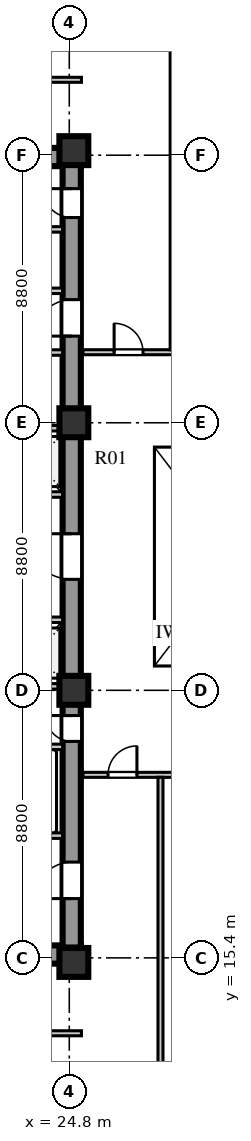
"""IFC4 building model, lengths in metres.
Left out: names, types, materials, properties, quantities, classifications, styles, units other than length and angle.
Written with IfcOpenShell. Run it as: python <this file> out.ifc"""

import sys

from ifc_helpers import new_model, si_unit, direction, frame, frame_2d, origin, origin_2d, place, context, subcontext, project, spatial, rectangle, extrude, element, fill, save


model = new_model("IFC4")
c1 = context("Model", 3, precision=1e-05, world=origin(), true_north=direction((0.0, 1.0)))
c2 = subcontext(c1, "Body", "Model", "MODEL_VIEW")
j1 = project(units=[si_unit("LENGTHUNIT", "METRE"), si_unit("PLANEANGLEUNIT", "RADIAN")], contexts=[c1])
p1 = place(None, origin())
s1 = spatial("IfcSite", under=j1, at=p1, CompositionType="ELEMENT")
p2 = place(p1, origin())
s2 = spatial("IfcBuilding", under=s1, at=p2, CompositionType="ELEMENT")
p3 = place(p2, frame((0.0, 0.0, 66.0)))
s3 = spatial("IfcBuildingStorey", under=s2, at=p3, CompositionType="ELEMENT", Elevation=66.0)
for number, where, z_axis, x_axis in (
    (1, (15.3, 15.51, 0.0), (0.0, 0.0, 1.0), (1.0, 0.0, 0.0)),
    (2, (15.3, 41.74, 0.0), (0.0, 0.0, 1.0), (1.0, 0.0, 0.0)),
):
    element("IfcWall", number, at=place(p3, frame(where, z_axis=z_axis, x_axis=x_axis)), inside=s3, PredefinedType="SHEAR", context=c2, shape_type="SweptSolid", body=[
        extrude(rectangle(XDim=9.88, YDim=0.6, at=frame_2d((4.94, 0.0))), origin(), (0.0, 0.0, 1.0), 3.72),
    ])
p4 = place(p3, frame((24.88, 15.74, 0.0), z_axis=(0.0, 0.0, 1.0), x_axis=(0.0, 1.0, 0.0)))
e3 = element("IfcWall", 3, at=p4, inside=s3, PredefinedType="SHEAR", context=c2, shape_type="SweptSolid", body=[
    extrude(rectangle(XDim=25.76, YDim=0.6, at=frame_2d((12.88, 0.0))), origin(), (0.0, 0.0, 1.0), 3.72),
])
p5 = place(p4, frame((1.61, 0.0, 0.0)))
e4 = element("IfcOpeningElement", 4, at=p5, cuts=e3, PredefinedType="OPENING", context=c2, shape_type="SweptSolid", body=[
    extrude(rectangle(XDim=1.2, YDim=2.1, at=frame_2d((0.6, 1.05))), frame((0.0, 0.31, 0.0), z_axis=(0.0, -1.0, 0.0), x_axis=(1.0, 0.0, 0.0)), (0.0, 0.0, 1.0), 0.62),
])
p6 = place(p4, frame((6.78, 0.0, 0.0)))
e5 = element("IfcOpeningElement", 5, at=p6, cuts=e3, PredefinedType="OPENING", context=c2, shape_type="SweptSolid", body=[
    extrude(rectangle(XDim=0.85, YDim=2.06, at=frame_2d((0.425, 1.03))), frame((0.0, 0.31, 0.0), z_axis=(0.0, -1.0, 0.0), x_axis=(1.0, 0.0, 0.0)), (0.0, 0.0, 1.0), 0.62),
])
p7 = place(p4, frame((12.11, 0.0, 0.0)))
e6 = element("IfcOpeningElement", 6, at=p7, cuts=e3, PredefinedType="OPENING", context=c2, shape_type="SweptSolid", body=[
    extrude(rectangle(XDim=1.5, YDim=2.12, at=frame_2d((0.75, 1.06))), frame((0.0, 0.31, 0.0), z_axis=(0.0, -1.0, 0.0), x_axis=(1.0, 0.0, 0.0)), (0.0, 0.0, 1.0), 0.62),
])
p8 = place(p4, frame((20.11, 0.0, 0.0)))
e7 = element("IfcOpeningElement", 7, at=p8, cuts=e3, PredefinedType="OPENING", context=c2, shape_type="SweptSolid", body=[
    extrude(rectangle(XDim=1.2, YDim=2.12, at=frame_2d((0.6, 1.06))), frame((0.0, 0.31, 0.0), z_axis=(0.0, -1.0, 0.0), x_axis=(1.0, 0.0, 0.0)), (0.0, 0.0, 1.0), 0.62),
])
p9 = place(p4, frame((24.01, 0.0, 0.0)))
e8 = element("IfcOpeningElement", 8, at=p9, cuts=e3, PredefinedType="OPENING", context=c2, shape_type="SweptSolid", body=[
    extrude(rectangle(XDim=0.95, YDim=2.1, at=frame_2d((0.475, 1.05))), frame((0.0, 0.31, 0.0), z_axis=(0.0, -1.0, 0.0), x_axis=(1.0, 0.0, 0.0)), (0.0, 0.0, 1.0), 0.62),
])
for number, where, z_axis, x_axis in (
    (9, (24.95, 15.25, 0.0), (0.0, 0.0, 1.0), (1.0, 0.0, 0.0)),
    (10, (24.95, 24.2, 0.0), (0.0, 0.0, 1.0), (1.0, 0.0, 0.0)),
    (11, (24.95, 33.0, 0.0), (0.0, 0.0, 1.0), (1.0, 0.0, 0.0)),
    (12, (24.95, 41.95, 0.0), (0.0, 0.0, 1.0), (1.0, 0.0, 0.0)),
):
    element("IfcColumn", number, at=place(p3, frame(where, z_axis=z_axis, x_axis=x_axis)), inside=s3, PredefinedType="COLUMN", context=c2, shape_type="SweptSolid", body=[
        extrude(rectangle(XDim=0.95, YDim=0.95, at=origin_2d()), origin(), (0.0, 0.0, 1.0), 3.72),
    ])
p10 = place(p3, frame((19.64, 19.42, 0.0), z_axis=(0.0, 0.0, 1.0), x_axis=(1.0, 0.0, 0.0)))
e13 = element("IfcWall", 13, at=p10, inside=s3, PredefinedType="SOLIDWALL", context=c2, shape_type="SweptSolid", body=[
    extrude(rectangle(XDim=4.94, YDim=0.18, at=frame_2d((2.47, 0.0))), origin(), (0.0, 0.0, 1.0), 3.72),
])
p11 = place(p10, frame((0.72, 0.0, 0.0)))
e14 = element("IfcOpeningElement", 14, at=p11, cuts=e13, PredefinedType="OPENING", context=c2, shape_type="SweptSolid", body=[
    extrude(rectangle(XDim=1.1, YDim=2.1, at=frame_2d((0.55, 1.05))), frame((0.0, 0.1, 0.0), z_axis=(0.0, -1.0, 0.0), x_axis=(1.0, 0.0, 0.0)), (0.0, 0.0, 1.0), 0.2),
])
p12 = place(p10, frame((3.02, 0.0, 0.0)))
e15 = element("IfcOpeningElement", 15, at=p12, cuts=e13, PredefinedType="OPENING", context=c2, shape_type="SweptSolid", body=[
    extrude(rectangle(XDim=1.1, YDim=2.1, at=frame_2d((0.55, 1.05))), frame((0.0, 0.1, 0.0), z_axis=(0.0, -1.0, 0.0), x_axis=(1.0, 0.0, 0.0)), (0.0, 0.0, 1.0), 0.2),
])
p13 = place(p3, frame((19.64, 22.34, 0.0), z_axis=(0.0, 0.0, 1.0), x_axis=(1.0, 0.0, 0.0)))
e16 = element("IfcWall", 16, at=p13, inside=s3, PredefinedType="SOLIDWALL", context=c2, shape_type="SweptSolid", body=[
    extrude(rectangle(XDim=4.94, YDim=0.18, at=frame_2d((2.47, 0.0))), origin(), (0.0, 0.0, 1.0), 3.72),
])
p14 = place(p3, frame((15.9, 26.52, 0.0), z_axis=(0.0, 0.0, 1.0), x_axis=(1.0, 0.0, 0.0)))
e17 = element("IfcWall", 17, at=p14, inside=s3, PredefinedType="SOLIDWALL", context=c2, shape_type="SweptSolid", body=[
    extrude(rectangle(XDim=8.68, YDim=0.18, at=frame_2d((4.34, 0.0))), origin(), (0.0, 0.0, 1.0), 3.72),
])
p15 = place(p14, frame((1.76, 0.0, 0.0)))
e18 = element("IfcOpeningElement", 18, at=p15, cuts=e17, PredefinedType="OPENING", context=c2, shape_type="SweptSolid", body=[
    extrude(rectangle(XDim=1.0, YDim=2.1, at=frame_2d((0.5, 1.05))), frame((0.0, 0.1, 0.0), z_axis=(0.0, -1.0, 0.0), x_axis=(1.0, 0.0, 0.0)), (0.0, 0.0, 1.0), 0.2),
])
p16 = place(p14, frame((3.6, 0.0, 0.0)))
e19 = element("IfcOpeningElement", 19, at=p16, cuts=e17, PredefinedType="OPENING", context=c2, shape_type="SweptSolid", body=[
    extrude(rectangle(XDim=1.0, YDim=2.1, at=frame_2d((0.5, 1.05))), frame((0.0, 0.1, 0.0), z_axis=(0.0, -1.0, 0.0), x_axis=(1.0, 0.0, 0.0)), (0.0, 0.0, 1.0), 0.2),
])
p17 = place(p14, frame((5.44, 0.0, 0.0)))
e20 = element("IfcOpeningElement", 20, at=p17, cuts=e17, PredefinedType="OPENING", context=c2, shape_type="SweptSolid", body=[
    extrude(rectangle(XDim=1.0, YDim=2.1, at=frame_2d((0.5, 1.05))), frame((0.0, 0.1, 0.0), z_axis=(0.0, -1.0, 0.0), x_axis=(1.0, 0.0, 0.0)), (0.0, 0.0, 1.0), 0.2),
])
p18 = place(p14, frame((7.28, 0.0, 0.0)))
e21 = element("IfcOpeningElement", 21, at=p18, cuts=e17, PredefinedType="OPENING", context=c2, shape_type="SweptSolid", body=[
    extrude(rectangle(XDim=1.0, YDim=2.1, at=frame_2d((0.5, 1.05))), frame((0.0, 0.1, 0.0), z_axis=(0.0, -1.0, 0.0), x_axis=(1.0, 0.0, 0.0)), (0.0, 0.0, 1.0), 0.2),
])
p19 = place(p3, frame((15.9, 24.33, 0.0), z_axis=(0.0, 0.0, 1.0), x_axis=(1.0, 0.0, 0.0)))
e22 = element("IfcWall", 22, at=p19, inside=s3, PredefinedType="SOLIDWALL", context=c2, shape_type="SweptSolid", body=[
    extrude(rectangle(XDim=8.68, YDim=0.18, at=frame_2d((4.34, 0.0))), origin(), (0.0, 0.0, 1.0), 3.02),
])
p20 = place(p3, frame((15.9, 30.64, 0.0), z_axis=(0.0, 0.0, 1.0), x_axis=(1.0, 0.0, 0.0)))
e23 = element("IfcWall", 23, at=p20, inside=s3, PredefinedType="SOLIDWALL", context=c2, shape_type="SweptSolid", body=[
    extrude(rectangle(XDim=8.68, YDim=0.18, at=frame_2d((4.34, 0.0))), origin(), (0.0, 0.0, 1.0), 3.72),
])
p21 = place(p20, frame((1.76, 0.0, 0.0)))
e24 = element("IfcOpeningElement", 24, at=p21, cuts=e23, PredefinedType="OPENING", context=c2, shape_type="SweptSolid", body=[
    extrude(rectangle(XDim=1.0, YDim=2.1, at=frame_2d((0.5, 1.05))), frame((0.0, 0.1, 0.0), z_axis=(0.0, -1.0, 0.0), x_axis=(1.0, 0.0, 0.0)), (0.0, 0.0, 1.0), 0.2),
])
p22 = place(p20, frame((3.6, 0.0, 0.0)))
e25 = element("IfcOpeningElement", 25, at=p22, cuts=e23, PredefinedType="OPENING", context=c2, shape_type="SweptSolid", body=[
    extrude(rectangle(XDim=1.0, YDim=2.1, at=frame_2d((0.5, 1.05))), frame((0.0, 0.1, 0.0), z_axis=(0.0, -1.0, 0.0), x_axis=(1.0, 0.0, 0.0)), (0.0, 0.0, 1.0), 0.2),
])
p23 = place(p20, frame((5.44, 0.0, 0.0)))
e26 = element("IfcOpeningElement", 26, at=p23, cuts=e23, PredefinedType="OPENING", context=c2, shape_type="SweptSolid", body=[
    extrude(rectangle(XDim=1.0, YDim=2.1, at=frame_2d((0.5, 1.05))), frame((0.0, 0.1, 0.0), z_axis=(0.0, -1.0, 0.0), x_axis=(1.0, 0.0, 0.0)), (0.0, 0.0, 1.0), 0.2),
])
p24 = place(p20, frame((7.28, 0.0, 0.0)))
e27 = element("IfcOpeningElement", 27, at=p24, cuts=e23, PredefinedType="OPENING", context=c2, shape_type="SweptSolid", body=[
    extrude(rectangle(XDim=1.0, YDim=2.1, at=frame_2d((0.5, 1.05))), frame((0.0, 0.1, 0.0), z_axis=(0.0, -1.0, 0.0), x_axis=(1.0, 0.0, 0.0)), (0.0, 0.0, 1.0), 0.2),
])
p25 = place(p3, frame((15.9, 32.82, 0.0), z_axis=(0.0, 0.0, 1.0), x_axis=(1.0, 0.0, 0.0)))
e28 = element("IfcWall", 28, at=p25, inside=s3, PredefinedType="SOLIDWALL", context=c2, shape_type="SweptSolid", body=[
    extrude(rectangle(XDim=8.68, YDim=0.18, at=frame_2d((4.34, 0.0))), origin(), (0.0, 0.0, 1.0), 3.02),
])
p26 = place(p3, frame((22.02, 35.31, 0.0), z_axis=(0.0, 0.0, 1.0), x_axis=(1.0, 0.0, 0.0)))
e29 = element("IfcWall", 29, at=p26, inside=s3, PredefinedType="SOLIDWALL", context=c2, shape_type="SweptSolid", body=[
    extrude(rectangle(XDim=2.56, YDim=0.18, at=frame_2d((1.28, 0.0))), origin(), (0.0, 0.0, 1.0), 3.72),
])
p27 = place(p26, frame((0.55, 0.0, 0.0)))
e30 = element("IfcOpeningElement", 30, at=p27, cuts=e29, PredefinedType="OPENING", context=c2, shape_type="SweptSolid", body=[
    extrude(rectangle(XDim=1.0, YDim=2.1, at=frame_2d((0.5, 1.05))), frame((0.0, 0.1, 0.0), z_axis=(0.0, -1.0, 0.0), x_axis=(1.0, 0.0, 0.0)), (0.0, 0.0, 1.0), 0.2),
])
p28 = place(p3, frame((19.64, 37.34, 0.0), z_axis=(0.0, 0.0, 1.0), x_axis=(1.0, 0.0, 0.0)))
e31 = element("IfcWall", 31, at=p28, inside=s3, PredefinedType="SOLIDWALL", context=c2, shape_type="SweptSolid", body=[
    extrude(rectangle(XDim=4.94, YDim=0.18, at=frame_2d((2.47, 0.0))), origin(), (0.0, 0.0, 1.0), 3.72),
])
p29 = place(p28, frame((0.45, 0.0, 0.0)))
e32 = element("IfcOpeningElement", 32, at=p29, cuts=e31, PredefinedType="OPENING", context=c2, shape_type="SweptSolid", body=[
    extrude(rectangle(XDim=1.0, YDim=2.1, at=frame_2d((0.5, 1.05))), frame((0.0, 0.1, 0.0), z_axis=(0.0, -1.0, 0.0), x_axis=(1.0, 0.0, 0.0)), (0.0, 0.0, 1.0), 0.2),
])
p30 = place(p28, frame((2.5, 0.0, 0.0)))
e33 = element("IfcOpeningElement", 33, at=p30, cuts=e31, PredefinedType="OPENING", context=c2, shape_type="SweptSolid", body=[
    extrude(rectangle(XDim=1.0, YDim=2.1, at=frame_2d((0.5, 1.05))), frame((0.0, 0.1, 0.0), z_axis=(0.0, -1.0, 0.0), x_axis=(1.0, 0.0, 0.0)), (0.0, 0.0, 1.0), 0.2),
])
p31 = place(p3, frame((19.64, 39.36, 0.0), z_axis=(0.0, 0.0, 1.0), x_axis=(1.0, 0.0, 0.0)))
e34 = element("IfcWall", 34, at=p31, inside=s3, PredefinedType="SOLIDWALL", context=c2, shape_type="SweptSolid", body=[
    extrude(rectangle(XDim=4.94, YDim=0.18, at=frame_2d((2.47, 0.0))), origin(), (0.0, 0.0, 1.0), 3.72),
])
p32 = place(p3, frame((25.25, 21.42, 0.0), z_axis=(0.0, 0.0, 1.0), x_axis=(1.0, 0.0, 0.0)))
e35 = element("IfcWall", 35, at=p32, inside=s3, PredefinedType="PARTITIONING", context=c2, shape_type="SweptSolid", body=[
    extrude(rectangle(XDim=12.87, YDim=0.165, at=frame_2d((6.435, 0.0))), origin(), (0.0, 0.0, 1.0), 3.32),
])
p33 = place(p32, frame((0.825, 0.0, 0.0)))
e36 = element("IfcOpeningElement", 36, at=p33, cuts=e35, PredefinedType="OPENING", context=c2, shape_type="SweptSolid", body=[
    extrude(rectangle(XDim=0.95, YDim=2.08, at=frame_2d((0.475, 1.04))), frame((0.0, 0.093, 0.0), z_axis=(0.0, -1.0, 0.0), x_axis=(1.0, 0.0, 0.0)), (0.0, 0.0, 1.0), 0.185),
])
p34 = place(p32, frame((3.325, 0.0, 0.0)))
e37 = element("IfcOpeningElement", 37, at=p34, cuts=e35, PredefinedType="OPENING", context=c2, shape_type="SweptSolid", body=[
    extrude(rectangle(XDim=0.95, YDim=2.08, at=frame_2d((0.475, 1.04))), frame((0.0, 0.093, 0.0), z_axis=(0.0, -1.0, 0.0), x_axis=(1.0, 0.0, 0.0)), (0.0, 0.0, 1.0), 0.185),
])
p35 = place(p32, frame((5.825, 0.0, 0.0)))
e38 = element("IfcOpeningElement", 38, at=p35, cuts=e35, PredefinedType="OPENING", context=c2, shape_type="SweptSolid", body=[
    extrude(rectangle(XDim=0.95, YDim=2.08, at=frame_2d((0.475, 1.04))), frame((0.0, 0.093, 0.0), z_axis=(0.0, -1.0, 0.0), x_axis=(1.0, 0.0, 0.0)), (0.0, 0.0, 1.0), 0.185),
])
p36 = place(p32, frame((8.375, 0.0, 0.0)))
e39 = element("IfcOpeningElement", 39, at=p36, cuts=e35, PredefinedType="OPENING", context=c2, shape_type="SweptSolid", body=[
    extrude(rectangle(XDim=0.95, YDim=2.08, at=frame_2d((0.475, 1.04))), frame((0.0, 0.093, 0.0), z_axis=(0.0, -1.0, 0.0), x_axis=(1.0, 0.0, 0.0)), (0.0, 0.0, 1.0), 0.185),
])
p37 = place(p32, frame((10.995, 0.0, 0.0)))
e40 = element("IfcOpeningElement", 40, at=p37, cuts=e35, PredefinedType="OPENING", context=c2, shape_type="SweptSolid", body=[
    extrude(rectangle(XDim=0.95, YDim=2.08, at=frame_2d((0.475, 1.04))), frame((0.0, 0.093, 0.0), z_axis=(0.0, -1.0, 0.0), x_axis=(1.0, 0.0, 0.0)), (0.0, 0.0, 1.0), 0.185),
])
p38 = place(p3, frame((25.25, 35.32, 0.0), z_axis=(0.0, 0.0, 1.0), x_axis=(1.0, 0.0, 0.0)))
e41 = element("IfcWall", 41, at=p38, inside=s3, PredefinedType="PARTITIONING", context=c2, shape_type="SweptSolid", body=[
    extrude(rectangle(XDim=9.47, YDim=0.165, at=frame_2d((4.735, 0.0))), origin(), (0.0, 0.0, 1.0), 3.72),
])
p39 = place(p38, frame((1.025, 0.0, 0.0)))
e42 = element("IfcOpeningElement", 42, at=p39, cuts=e41, PredefinedType="OPENING", context=c2, shape_type="SweptSolid", body=[
    extrude(rectangle(XDim=0.95, YDim=2.08, at=frame_2d((0.475, 1.04))), frame((0.0, 0.093, 0.0), z_axis=(0.0, -1.0, 0.0), x_axis=(1.0, 0.0, 0.0)), (0.0, 0.0, 1.0), 0.185),
])
p40 = place(p38, frame((4.125, 0.0, 0.0)))
e43 = element("IfcOpeningElement", 43, at=p40, cuts=e41, PredefinedType="OPENING", context=c2, shape_type="SweptSolid", body=[
    extrude(rectangle(XDim=0.95, YDim=2.08, at=frame_2d((0.475, 1.04))), frame((0.0, 0.093, 0.0), z_axis=(0.0, -1.0, 0.0), x_axis=(1.0, 0.0, 0.0)), (0.0, 0.0, 1.0), 0.185),
])
p41 = place(p38, frame((7.365, 0.0, 0.0)))
e44 = element("IfcOpeningElement", 44, at=p41, cuts=e41, PredefinedType="OPENING", context=c2, shape_type="SweptSolid", body=[
    extrude(rectangle(XDim=0.95, YDim=2.08, at=frame_2d((0.475, 1.04))), frame((0.0, 0.093, 0.0), z_axis=(0.0, -1.0, 0.0), x_axis=(1.0, 0.0, 0.0)), (0.0, 0.0, 1.0), 0.185),
])
p42 = place(p3, frame((10.5, 12.92, 0.0), z_axis=(0.0, 0.0, 1.0), x_axis=(1.0, 0.0, 0.0)))
e45 = element("IfcWall", 45, at=p42, inside=s3, PredefinedType="PARTITIONING", context=c2, shape_type="SweptSolid", body=[
    extrude(rectangle(XDim=14.7, YDim=0.165, at=frame_2d((7.35, 0.0))), origin(), (0.0, 0.0, 1.0), 3.72),
])
p43 = place(p42, frame((6.2, 0.0, 0.0)))
e46 = element("IfcOpeningElement", 46, at=p43, cuts=e45, PredefinedType="OPENING", context=c2, shape_type="SweptSolid", body=[
    extrude(rectangle(XDim=1.0, YDim=2.08, at=frame_2d((0.5, 1.04))), frame((0.0, 0.093, 0.0), z_axis=(0.0, -1.0, 0.0), x_axis=(1.0, 0.0, 0.0)), (0.0, 0.0, 1.0), 0.185),
])
p44 = place(p3, frame((10.5, 44.28, 0.0), z_axis=(0.0, 0.0, 1.0), x_axis=(1.0, 0.0, 0.0)))
e47 = element("IfcWall", 47, at=p44, inside=s3, PredefinedType="PARTITIONING", context=c2, shape_type="SweptSolid", body=[
    extrude(rectangle(XDim=14.7, YDim=0.165, at=frame_2d((7.35, 0.0))), origin(), (0.0, 0.0, 1.0), 3.72),
])
p45 = place(p44, frame((6.2, 0.0, 0.0)))
e48 = element("IfcOpeningElement", 48, at=p45, cuts=e47, PredefinedType="OPENING", context=c2, shape_type="SweptSolid", body=[
    extrude(rectangle(XDim=1.0, YDim=2.08, at=frame_2d((0.5, 1.04))), frame((0.0, 0.093, 0.0), z_axis=(0.0, -1.0, 0.0), x_axis=(1.0, 0.0, 0.0)), (0.0, 0.0, 1.0), 0.185),
])
p46 = place(p3, frame((27.8, 6.88, 0.0), z_axis=(0.0, 0.0, 1.0), x_axis=(0.0, 1.0, 0.0)))
e49 = element("IfcWall", 49, at=p46, inside=s3, PredefinedType="PARTITIONING", context=c2, shape_type="SweptSolid", body=[
    extrude(rectangle(XDim=14.46, YDim=0.165, at=frame_2d((7.23, 0.0))), origin(), (0.0, 0.0, 1.0), 3.72),
])
p47 = place(p3, frame((28.2, 35.4, 0.0), z_axis=(0.0, 0.0, 1.0), x_axis=(0.0, 1.0, 0.0)))
e50 = element("IfcWall", 50, at=p47, inside=s3, PredefinedType="PARTITIONING", context=c2, shape_type="SweptSolid", body=[
    extrude(rectangle(XDim=14.92, YDim=0.165, at=frame_2d((7.46, 0.0))), origin(), (0.0, 0.0, 1.0), 3.72),
])
p48 = place(p5, frame((1.2, 0.0, 0.0), z_axis=(0.0, 0.0, 1.0), x_axis=(-1.0, 0.0, 0.0)))
e51 = element("IfcDoor", 51, at=p48, inside=s3, OperationType="SINGLE_SWING_RIGHT", PredefinedType="DOOR", context=c2, shape_type="SweptSolid", body=[
    extrude(rectangle(XDim=1.2, YDim=2.1, at=frame_2d((0.6, 1.05))), frame((0.0, 0.025, 0.0), z_axis=(0.0, -1.0, 0.0), x_axis=(1.0, 0.0, 0.0)), (0.0, 0.0, 1.0), 0.05),
])
fill(e4, e51)
p49 = place(p6, frame((0.85, 0.0, 0.0), z_axis=(0.0, 0.0, 1.0), x_axis=(-1.0, 0.0, 0.0)))
e52 = element("IfcDoor", 52, at=p49, inside=s3, OperationType="SINGLE_SWING_LEFT", PredefinedType="DOOR", context=c2, shape_type="SweptSolid", body=[
    extrude(rectangle(XDim=0.85, YDim=2.06, at=frame_2d((0.425, 1.03))), frame((0.0, 0.025, 0.0), z_axis=(0.0, -1.0, 0.0), x_axis=(1.0, 0.0, 0.0)), (0.0, 0.0, 1.0), 0.05),
])
fill(e5, e52)
p50 = place(p7, frame((1.5, 0.0, 0.0), z_axis=(0.0, 0.0, 1.0), x_axis=(-1.0, 0.0, 0.0)))
e53 = element("IfcDoor", 53, at=p50, inside=s3, OperationType="SINGLE_SWING_LEFT", PredefinedType="DOOR", context=c2, shape_type="SweptSolid", body=[
    extrude(rectangle(XDim=1.5, YDim=2.12, at=frame_2d((0.75, 1.06))), frame((0.0, 0.025, 0.0), z_axis=(0.0, -1.0, 0.0), x_axis=(1.0, 0.0, 0.0)), (0.0, 0.0, 1.0), 0.05),
])
fill(e6, e53)
p51 = place(p8, frame((1.2, 0.0, 0.0), z_axis=(0.0, 0.0, 1.0), x_axis=(-1.0, 0.0, 0.0)))
e54 = element("IfcDoor", 54, at=p51, inside=s3, OperationType="SINGLE_SWING_RIGHT", PredefinedType="DOOR", context=c2, shape_type="SweptSolid", body=[
    extrude(rectangle(XDim=1.2, YDim=2.12, at=frame_2d((0.6, 1.06))), frame((0.0, 0.025, 0.0), z_axis=(0.0, -1.0, 0.0), x_axis=(1.0, 0.0, 0.0)), (0.0, 0.0, 1.0), 0.05),
])
fill(e7, e54)
p52 = place(p9, frame((0.95, 0.0, 0.0), z_axis=(0.0, 0.0, 1.0), x_axis=(-1.0, 0.0, 0.0)))
e55 = element("IfcDoor", 55, at=p52, inside=s3, OperationType="SINGLE_SWING_LEFT", PredefinedType="DOOR", context=c2, shape_type="SweptSolid", body=[
    extrude(rectangle(XDim=0.95, YDim=2.1, at=frame_2d((0.475, 1.05))), frame((0.0, 0.025, 0.0), z_axis=(0.0, -1.0, 0.0), x_axis=(1.0, 0.0, 0.0)), (0.0, 0.0, 1.0), 0.05),
])
fill(e8, e55)
p53 = place(p33, frame((0.95, 0.0, 0.0), z_axis=(0.0, 0.0, 1.0), x_axis=(-1.0, 0.0, 0.0)))
e56 = element("IfcDoor", 56, at=p53, inside=s3, OperationType="SINGLE_SWING_LEFT", PredefinedType="DOOR", context=c2, shape_type="SweptSolid", body=[
    extrude(rectangle(XDim=0.95, YDim=2.08, at=frame_2d((0.475, 1.04))), frame((0.0, 0.025, 0.0), z_axis=(0.0, -1.0, 0.0), x_axis=(1.0, 0.0, 0.0)), (0.0, 0.0, 1.0), 0.05),
])
fill(e36, e56)
p54 = place(p39, origin())
e57 = element("IfcDoor", 57, at=p54, inside=s3, OperationType="SINGLE_SWING_LEFT", PredefinedType="DOOR", context=c2, shape_type="SweptSolid", body=[
    extrude(rectangle(XDim=0.95, YDim=2.08, at=frame_2d((0.475, 1.04))), frame((0.0, 0.025, 0.0), z_axis=(0.0, -1.0, 0.0), x_axis=(1.0, 0.0, 0.0)), (0.0, 0.0, 1.0), 0.05),
])
fill(e42, e57)
save(model, sys.argv[1])
